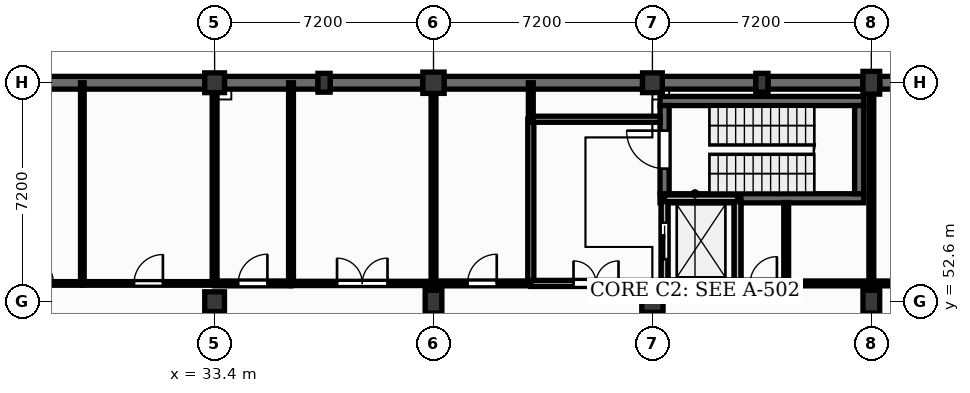
"""IFC4 building model, lengths in metres.
Left out: names, types, materials, properties, quantities, classifications, styles, units other than length and angle.
Written with IfcOpenShell. Run it as: python <this file> out.ifc"""

import sys

from ifc_helpers import new_model, si_unit, direction, frame, frame_2d, origin, origin_2d, place, context, subcontext, project, spatial, rectangle, extrude, element, fill, save


model = new_model("IFC4")
c1 = context("Model", 3, precision=1e-05, world=origin(), true_north=direction((0.0, 1.0)))
c2 = subcontext(c1, "Body", "Model", "MODEL_VIEW")
j1 = project(units=[si_unit("LENGTHUNIT", "METRE"), si_unit("PLANEANGLEUNIT", "RADIAN")], contexts=[c1])
p1 = place(None, origin())
s1 = spatial("IfcSite", under=j1, at=p1, CompositionType="ELEMENT")
p2 = place(p1, origin())
s2 = spatial("IfcBuilding", under=s1, at=p2, CompositionType="ELEMENT")
p3 = place(p2, frame((0.0, 0.0, -4.5)))
s3 = spatial("IfcBuildingStorey", under=s2, at=p3, CompositionType="ELEMENT", Elevation=-4.5)
for number, where, z_axis, x_axis in (
    (1, (33.4, 52.6, 0.0), (0.0, 0.0, 1.0), (1.0, 0.0, 0.0)),
    (2, (33.4, 59.8, 0.0), (0.0, 0.0, 1.0), (1.0, 0.0, 0.0)),
):
    element("IfcColumn", number, at=place(p3, frame(where, z_axis=z_axis, x_axis=x_axis)), inside=s3, PredefinedType="COLUMN", context=c2, shape_type="SweptSolid", body=[
        extrude(rectangle(XDim=0.65, YDim=0.65, at=origin_2d()), origin(), (0.0, 0.0, 1.0), 4.2),
    ])
p4 = place(p3, frame((40.6, 52.6, 0.0), z_axis=(0.0, 0.0, 1.0), x_axis=(1.0, 0.0, 0.0)))
e3 = element("IfcColumn", 3, at=p4, inside=s3, PredefinedType="COLUMN", context=c2, shape_type="SweptSolid", body=[
    extrude(rectangle(XDim=0.55, YDim=0.75, at=origin_2d()), origin(), (0.0, 0.0, 1.0), 4.2),
])
for number, where, z_axis, x_axis in (
    (4, (40.6, 59.8, 0.0), (0.0, 0.0, 1.0), (1.0, 0.0, 0.0)),
    (5, (47.8, 52.6, 0.0), (0.0, 0.0, 1.0), (1.0, 0.0, 0.0)),
):
    element("IfcColumn", number, at=place(p3, frame(where, z_axis=z_axis, x_axis=x_axis)), inside=s3, PredefinedType="COLUMN", context=c2, shape_type="SweptSolid", body=[
        extrude(rectangle(XDim=0.7, YDim=0.7, at=origin_2d()), origin(), (0.0, 0.0, 1.0), 4.2),
    ])
p5 = place(p3, frame((47.8, 59.8, 0.0), z_axis=(0.0, 0.0, 1.0), x_axis=(1.0, 0.0, 0.0)))
e6 = element("IfcColumn", 6, at=p5, inside=s3, PredefinedType="COLUMN", context=c2, shape_type="SweptSolid", body=[
    extrude(rectangle(XDim=0.65, YDim=0.65, at=origin_2d()), origin(), (0.0, 0.0, 1.0), 4.2),
])
for number, where, z_axis, x_axis in (
    (7, (55.0, 52.6, 0.0), (0.0, 0.0, 1.0), (1.0, 0.0, 0.0)),
    (8, (55.0, 59.8, 0.0), (0.0, 0.0, 1.0), (1.0, 0.0, 0.0)),
):
    element("IfcColumn", number, at=place(p3, frame(where, z_axis=z_axis, x_axis=x_axis)), inside=s3, PredefinedType="COLUMN", context=c2, shape_type="SweptSolid", body=[
        extrude(rectangle(XDim=0.55, YDim=0.75, at=origin_2d()), origin(), (0.0, 0.0, 1.0), 4.2),
    ])
for number, where, z_axis, x_axis in (
    (9, (37.0, 59.8, 0.0), (0.0, 0.0, 1.0), (1.0, 0.0, 0.0)),
    (10, (51.4, 59.8, 0.0), (0.0, 0.0, 1.0), (1.0, 0.0, 0.0)),
):
    element("IfcColumn", number, at=place(p3, frame(where, z_axis=z_axis, x_axis=x_axis)), inside=s3, PredefinedType="PILASTER", context=c2, shape_type="SweptSolid", body=[
        extrude(rectangle(XDim=0.4, YDim=0.62, at=origin_2d()), origin(), (0.0, 0.0, 1.0), 4.2),
    ])
p6 = place(p3, frame((26.475, 59.8, 0.0), z_axis=(0.0, 0.0, 1.0), x_axis=(1.0, 0.0, 0.0)))
e11 = element("IfcWall", 11, at=p6, inside=s3, PredefinedType="USERDEFINED", context=c2, shape_type="SweptSolid", body=[
    extrude(rectangle(XDim=6.6, YDim=0.42, at=frame_2d((3.3, 0.0))), origin(), (0.0, 0.0, 1.0), 4.2),
])
p7 = place(p3, frame((33.725, 59.8, 0.0), z_axis=(0.0, 0.0, 1.0), x_axis=(1.0, 0.0, 0.0)))
e12 = element("IfcWall", 12, at=p7, inside=s3, PredefinedType="USERDEFINED", context=c2, shape_type="SweptSolid", body=[
    extrude(rectangle(XDim=3.075, YDim=0.42, at=frame_2d((1.538, 0.0))), origin(), (0.0, 0.0, 1.0), 4.2),
])
p8 = place(p3, frame((37.2, 59.8, 0.0), z_axis=(0.0, 0.0, 1.0), x_axis=(1.0, 0.0, 0.0)))
e13 = element("IfcWall", 13, at=p8, inside=s3, PredefinedType="USERDEFINED", context=c2, shape_type="SweptSolid", body=[
    extrude(rectangle(XDim=3.05, YDim=0.42, at=frame_2d((1.525, 0.0))), origin(), (0.0, 0.0, 1.0), 4.2),
])
p9 = place(p3, frame((40.95, 59.8, 0.0), z_axis=(0.0, 0.0, 1.0), x_axis=(1.0, 0.0, 0.0)))
e14 = element("IfcWall", 14, at=p9, inside=s3, PredefinedType="USERDEFINED", context=c2, shape_type="SweptSolid", body=[
    extrude(rectangle(XDim=6.525, YDim=0.42, at=frame_2d((3.263, 0.0))), origin(), (0.0, 0.0, 1.0), 4.2),
])
p10 = place(p3, frame((48.125, 59.8, 0.0), z_axis=(0.0, 0.0, 1.0), x_axis=(1.0, 0.0, 0.0)))
e15 = element("IfcWall", 15, at=p10, inside=s3, PredefinedType="USERDEFINED", context=c2, shape_type="SweptSolid", body=[
    extrude(rectangle(XDim=3.075, YDim=0.42, at=frame_2d((1.538, 0.0))), origin(), (0.0, 0.0, 1.0), 4.2),
])
p11 = place(p3, frame((51.6, 59.8, 0.0), z_axis=(0.0, 0.0, 1.0), x_axis=(1.0, 0.0, 0.0)))
e16 = element("IfcWall", 16, at=p11, inside=s3, PredefinedType="USERDEFINED", context=c2, shape_type="SweptSolid", body=[
    extrude(rectangle(XDim=3.125, YDim=0.42, at=frame_2d((1.562, 0.0))), origin(), (0.0, 0.0, 1.0), 4.2),
])
p12 = place(p3, frame((55.275, 59.8, 0.0), z_axis=(0.0, 0.0, 1.0), x_axis=(1.0, 0.0, 0.0)))
e17 = element("IfcWall", 17, at=p12, inside=s3, PredefinedType="USERDEFINED", context=c2, shape_type="SweptSolid", body=[
    extrude(rectangle(XDim=3.15, YDim=0.42, at=frame_2d((1.575, 0.0))), origin(), (0.0, 0.0, 1.0), 4.2),
])
for number, where, z_axis, x_axis in (
    (18, (48.05, 56.0, 0.0), (0.0, 0.0, 1.0), (1.0, 0.0, 0.0)),
    (19, (48.05, 59.2, 0.0), (0.0, 0.0, 1.0), (1.0, 0.0, 0.0)),
):
    element("IfcWall", number, at=place(p3, frame(where, z_axis=z_axis, x_axis=x_axis)), inside=s3, PredefinedType="SHEAR", context=c2, shape_type="SweptSolid", body=[
        extrude(rectangle(XDim=6.7, YDim=0.3, at=frame_2d((3.35, 0.0))), origin(), (0.0, 0.0, 1.0), 4.25),
    ])
p13 = place(p3, frame((48.2, 56.15, 0.0), z_axis=(0.0, 0.0, 1.0), x_axis=(0.0, 1.0, 0.0)))
e20 = element("IfcWall", 20, at=p13, inside=s3, PredefinedType="SHEAR", context=c2, shape_type="SweptSolid", body=[
    extrude(rectangle(XDim=2.9, YDim=0.3, at=frame_2d((1.45, 0.0))), origin(), (0.0, 0.0, 1.0), 4.25),
])
p14 = place(p13, frame((0.825, 0.0, 0.0)))
e21 = element("IfcOpeningElement", 21, at=p14, cuts=e20, PredefinedType="OPENING", context=c2, shape_type="SweptSolid", body=[
    extrude(rectangle(XDim=1.25, YDim=2.15, at=frame_2d((0.625, 1.075))), frame((0.0, 0.16, 0.0), z_axis=(0.0, -1.0, 0.0), x_axis=(1.0, 0.0, 0.0)), (0.0, 0.0, 1.0), 0.32),
])
p15 = place(p3, frame((54.6, 56.15, 0.0), z_axis=(0.0, 0.0, 1.0), x_axis=(0.0, 1.0, 0.0)))
e22 = element("IfcWall", 22, at=p15, inside=s3, PredefinedType="SHEAR", context=c2, shape_type="SweptSolid", body=[
    extrude(rectangle(XDim=2.9, YDim=0.3, at=frame_2d((1.45, 0.0))), origin(), (0.0, 0.0, 1.0), 4.25),
])
p16 = place(p3, frame((48.2, 53.2, 0.0), z_axis=(0.0, 0.0, 1.0), x_axis=(1.0, 0.0, 0.0)))
e23 = element("IfcWall", 23, at=p16, inside=s3, PredefinedType="SOLIDWALL", context=c2, shape_type="SweptSolid", body=[
    extrude(rectangle(XDim=2.4, YDim=0.22, at=frame_2d((1.2, 0.0))), origin(), (0.0, 0.0, 1.0), 4.25),
])
p17 = place(p3, frame((48.2, 53.31, 0.0), z_axis=(0.0, 0.0, 1.0), x_axis=(0.0, 1.0, 0.0)))
e24 = element("IfcWall", 24, at=p17, inside=s3, PredefinedType="SOLIDWALL", context=c2, shape_type="SweptSolid", body=[
    extrude(rectangle(XDim=2.58, YDim=0.22, at=frame_2d((1.29, 0.0))), origin(), (0.0, 0.0, 1.0), 4.25),
])
p18 = place(p17, frame((0.69, 0.0, 0.0)))
e25 = element("IfcOpeningElement", 25, at=p18, cuts=e24, PredefinedType="OPENING", context=c2, shape_type="SweptSolid", body=[
    extrude(rectangle(XDim=1.2, YDim=2.15, at=frame_2d((0.6, 1.075))), frame((0.0, 0.12, 0.0), z_axis=(0.0, -1.0, 0.0), x_axis=(1.0, 0.0, 0.0)), (0.0, 0.0, 1.0), 0.24),
])
p19 = place(p3, frame((50.6, 53.31, 0.0), z_axis=(0.0, 0.0, 1.0), x_axis=(0.0, 1.0, 0.0)))
e26 = element("IfcWall", 26, at=p19, inside=s3, PredefinedType="SOLIDWALL", context=c2, shape_type="SweptSolid", body=[
    extrude(rectangle(XDim=2.58, YDim=0.22, at=frame_2d((1.29, 0.0))), origin(), (0.0, 0.0, 1.0), 4.25),
])
for number, where, z_axis, x_axis in (
    (27, (48.2, 53.2, -0.9), (0.0, 0.0, 1.0), (0.0, 1.0, 0.0)),
    (28, (50.6, 53.2, -0.9), (0.0, 0.0, 1.0), (0.0, 1.0, 0.0)),
):
    element("IfcWall", number, at=place(p3, frame(where, z_axis=z_axis, x_axis=x_axis)), inside=s3, PredefinedType="SOLIDWALL", context=c2, shape_type="SweptSolid", body=[
        extrude(rectangle(XDim=2.8, YDim=0.22, at=frame_2d((1.4, 0.0))), origin(), (0.0, 0.0, 1.0), 0.9),
    ])
for number, where, z_axis, x_axis in (
    (29, (48.2, 53.2, -0.9), (0.0, 0.0, 1.0), (1.0, 0.0, 0.0)),
    (30, (48.2, 56.0, -0.9), (0.0, 0.0, 1.0), (1.0, 0.0, 0.0)),
):
    element("IfcWall", number, at=place(p3, frame(where, z_axis=z_axis, x_axis=x_axis)), inside=s3, PredefinedType="SOLIDWALL", context=c2, shape_type="SweptSolid", body=[
        extrude(rectangle(XDim=2.4, YDim=0.22, at=frame_2d((1.2, 0.0))), origin(), (0.0, 0.0, 1.0), 0.9),
    ])
p20 = place(p3, frame((26.2, 53.2, 0.0), z_axis=(0.0, 0.0, 1.0), x_axis=(1.0, 0.0, 0.0)))
e31 = element("IfcWall", 31, at=p20, inside=s3, PredefinedType="PLUMBINGWALL", context=c2, shape_type="SweptSolid", body=[
    extrude(rectangle(XDim=2.85, YDim=0.12, at=frame_2d((1.425, 0.0))), origin(), (0.0, 0.0, 1.0), 4.08),
])
p21 = place(p20, frame((0.95, 0.0, 0.0)))
e32 = element("IfcOpeningElement", 32, at=p21, cuts=e31, PredefinedType="OPENING", context=c2, shape_type="SweptSolid", body=[
    extrude(rectangle(XDim=0.95, YDim=2.1, at=frame_2d((0.475, 1.05))), frame((0.0, 0.07, 0.0), z_axis=(0.0, -1.0, 0.0), x_axis=(1.0, 0.0, 0.0)), (0.0, 0.0, 1.0), 0.14),
])
p22 = place(p3, frame((29.05, 53.27, 0.0), z_axis=(0.0, 0.0, 1.0), x_axis=(0.0, 1.0, 0.0)))
e33 = element("IfcWall", 33, at=p22, inside=s3, PredefinedType="PLUMBINGWALL", context=c2, shape_type="SweptSolid", body=[
    extrude(rectangle(XDim=6.53, YDim=0.12, at=frame_2d((3.265, 0.0))), origin(), (0.0, 0.0, 1.0), 4.08),
])
p23 = place(p3, frame((29.05, 53.2, 0.0), z_axis=(0.0, 0.0, 1.0), x_axis=(1.0, 0.0, 0.0)))
e34 = element("IfcWall", 34, at=p23, inside=s3, PredefinedType="PLUMBINGWALL", context=c2, shape_type="SweptSolid", body=[
    extrude(rectangle(XDim=4.35, YDim=0.12, at=frame_2d((2.175, 0.0))), origin(), (0.0, 0.0, 1.0), 4.08),
])
p24 = place(p23, frame((1.7, 0.0, 0.0)))
e35 = element("IfcOpeningElement", 35, at=p24, cuts=e34, PredefinedType="OPENING", context=c2, shape_type="SweptSolid", body=[
    extrude(rectangle(XDim=0.95, YDim=2.1, at=frame_2d((0.475, 1.05))), frame((0.0, 0.07, 0.0), z_axis=(0.0, -1.0, 0.0), x_axis=(1.0, 0.0, 0.0)), (0.0, 0.0, 1.0), 0.14),
])
p25 = place(p3, frame((33.4, 53.27, 0.0), z_axis=(0.0, 0.0, 1.0), x_axis=(0.0, 1.0, 0.0)))
e36 = element("IfcWall", 36, at=p25, inside=s3, PredefinedType="PARTITIONING", context=c2, shape_type="SweptSolid", body=[
    extrude(rectangle(XDim=6.205, YDim=0.16, at=frame_2d((3.103, 0.0))), origin(), (0.0, 0.0, 1.0), 3.5),
])
p26 = place(p3, frame((33.4, 53.2, 0.0), z_axis=(0.0, 0.0, 1.0), x_axis=(1.0, 0.0, 0.0)))
e37 = element("IfcWall", 37, at=p26, inside=s3, PredefinedType="PARTITIONING", context=c2, shape_type="SweptSolid", body=[
    extrude(rectangle(XDim=2.513, YDim=0.16, at=frame_2d((1.257, 0.0))), origin(), (0.0, 0.0, 1.0), 4.08),
])
p27 = place(p26, frame((0.777, 0.0, 0.0)))
e38 = element("IfcOpeningElement", 38, at=p27, cuts=e37, PredefinedType="OPENING", context=c2, shape_type="SweptSolid", body=[
    extrude(rectangle(XDim=0.96, YDim=2.1, at=frame_2d((0.48, 1.05))), frame((0.0, 0.09, 0.0), z_axis=(0.0, -1.0, 0.0), x_axis=(1.0, 0.0, 0.0)), (0.0, 0.0, 1.0), 0.18),
])
p28 = place(p3, frame((35.913, 53.27, 0.0), z_axis=(0.0, 0.0, 1.0), x_axis=(0.0, 1.0, 0.0)))
e39 = element("IfcWall", 39, at=p28, inside=s3, PredefinedType="PARTITIONING", context=c2, shape_type="SweptSolid", body=[
    extrude(rectangle(XDim=6.53, YDim=0.16, at=frame_2d((3.265, 0.0))), origin(), (0.0, 0.0, 1.0), 4.08),
])
p29 = place(p3, frame((35.913, 53.2, 0.0), z_axis=(0.0, 0.0, 1.0), x_axis=(1.0, 0.0, 0.0)))
e40 = element("IfcWall", 40, at=p29, inside=s3, PredefinedType="PARTITIONING", context=c2, shape_type="SweptSolid", body=[
    extrude(rectangle(XDim=4.687, YDim=0.14, at=frame_2d((2.344, 0.0))), origin(), (0.0, 0.0, 1.0), 4.08),
])
p30 = place(p29, frame((1.513, 0.0, 0.0)))
e41 = element("IfcOpeningElement", 41, at=p30, cuts=e40, PredefinedType="OPENING", context=c2, shape_type="SweptSolid", body=[
    extrude(rectangle(XDim=1.66, YDim=2.3, at=frame_2d((0.83, 1.15))), frame((0.0, 0.08, 0.0), z_axis=(0.0, -1.0, 0.0), x_axis=(1.0, 0.0, 0.0)), (0.0, 0.0, 1.0), 0.16),
])
p31 = place(p3, frame((40.6, 53.27, 0.0), z_axis=(0.0, 0.0, 1.0), x_axis=(0.0, 1.0, 0.0)))
e42 = element("IfcWall", 42, at=p31, inside=s3, PredefinedType="PARTITIONING", context=c2, shape_type="SweptSolid", body=[
    extrude(rectangle(XDim=6.18, YDim=0.16, at=frame_2d((3.09, 0.0))), origin(), (0.0, 0.0, 1.0), 3.5),
])
p32 = place(p3, frame((40.6, 53.2, 0.0), z_axis=(0.0, 0.0, 1.0), x_axis=(1.0, 0.0, 0.0)))
e43 = element("IfcWall", 43, at=p32, inside=s3, PredefinedType="PARTITIONING", context=c2, shape_type="SweptSolid", body=[
    extrude(rectangle(XDim=3.2, YDim=0.16, at=frame_2d((1.6, 0.0))), origin(), (0.0, 0.0, 1.0), 4.08),
])
p33 = place(p32, frame((1.12, 0.0, 0.0)))
e44 = element("IfcOpeningElement", 44, at=p33, cuts=e43, PredefinedType="OPENING", context=c2, shape_type="SweptSolid", body=[
    extrude(rectangle(XDim=0.96, YDim=2.1, at=frame_2d((0.48, 1.05))), frame((0.0, 0.09, 0.0), z_axis=(0.0, -1.0, 0.0), x_axis=(1.0, 0.0, 0.0)), (0.0, 0.0, 1.0), 0.18),
])
p34 = place(p3, frame((43.8, 53.27, 0.0), z_axis=(0.0, 0.0, 1.0), x_axis=(0.0, 1.0, 0.0)))
e45 = element("IfcWall", 45, at=p34, inside=s3, PredefinedType="PARTITIONING", context=c2, shape_type="SweptSolid", body=[
    extrude(rectangle(XDim=5.33, YDim=0.2, at=frame_2d((2.665, 0.0))), origin(), (0.0, 0.0, 1.0), 4.08),
])
p35 = place(p3, frame((43.8, 53.2, 0.0), z_axis=(0.0, 0.0, 1.0), x_axis=(1.0, 0.0, 0.0)))
e46 = element("IfcWall", 46, at=p35, inside=s3, PredefinedType="PARTITIONING", context=c2, shape_type="SweptSolid", body=[
    extrude(rectangle(XDim=4.29, YDim=0.2, at=frame_2d((2.145, 0.0))), origin(), (0.0, 0.0, 1.0), 4.08),
])
p36 = place(p35, frame((1.405, 0.0, 0.0)))
e47 = element("IfcOpeningElement", 47, at=p36, cuts=e46, PredefinedType="OPENING", context=c2, shape_type="SweptSolid", body=[
    extrude(rectangle(XDim=1.48, YDim=2.25, at=frame_2d((0.74, 1.125))), frame((0.0, 0.11, 0.0), z_axis=(0.0, -1.0, 0.0), x_axis=(1.0, 0.0, 0.0)), (0.0, 0.0, 1.0), 0.22),
])
p37 = place(p3, frame((50.71, 53.2, 0.0), z_axis=(0.0, 0.0, 1.0), x_axis=(1.0, 0.0, 0.0)))
e48 = element("IfcWall", 48, at=p37, inside=s3, PredefinedType="SOLIDWALL", context=c2, shape_type="SweptSolid", body=[
    extrude(rectangle(XDim=1.49, YDim=0.22, at=frame_2d((0.745, 0.0))), origin(), (0.0, 0.0, 1.0), 4.08),
])
p38 = place(p37, frame((0.305, 0.0, 0.0)))
e49 = element("IfcOpeningElement", 49, at=p38, cuts=e48, PredefinedType="OPENING", context=c2, shape_type="SweptSolid", body=[
    extrude(rectangle(XDim=0.88, YDim=2.05, at=frame_2d((0.44, 1.025))), frame((0.0, 0.12, 0.0), z_axis=(0.0, -1.0, 0.0), x_axis=(1.0, 0.0, 0.0)), (0.0, 0.0, 1.0), 0.24),
])
p39 = place(p3, frame((55.0, 53.2, 0.0), z_axis=(0.0, 0.0, 1.0), x_axis=(1.0, 0.0, 0.0)))
e50 = element("IfcWall", 50, at=p39, inside=s3, PredefinedType="PARTITIONING", context=c2, shape_type="SweptSolid", body=[
    extrude(rectangle(XDim=7.2, YDim=0.16, at=frame_2d((3.6, 0.0))), origin(), (0.0, 0.0, 1.0), 4.08),
])
p40 = place(p39, frame((3.12, 0.0, 0.0)))
e51 = element("IfcOpeningElement", 51, at=p40, cuts=e50, PredefinedType="OPENING", context=c2, shape_type="SweptSolid", body=[
    extrude(rectangle(XDim=0.96, YDim=2.1, at=frame_2d((0.48, 1.05))), frame((0.0, 0.09, 0.0), z_axis=(0.0, -1.0, 0.0), x_axis=(1.0, 0.0, 0.0)), (0.0, 0.0, 1.0), 0.18),
])
p41 = place(p3, frame((52.2, 53.27, 0.0), z_axis=(0.0, 0.0, 1.0), x_axis=(0.0, 1.0, 0.0)))
e52 = element("IfcWall", 52, at=p41, inside=s3, PredefinedType="PARTITIONING", context=c2, shape_type="SweptSolid", body=[
    extrude(rectangle(XDim=2.59, YDim=0.16, at=frame_2d((1.295, 0.0))), origin(), (0.0, 0.0, 1.0), 4.08),
])
p42 = place(p3, frame((48.06, 58.6, 0.0), z_axis=(0.0, 0.0, 1.0), x_axis=(-1.0, 0.0, 0.0)))
e53 = element("IfcWall", 53, at=p42, inside=s3, PredefinedType="PARTITIONING", context=c2, shape_type="SweptSolid", body=[
    extrude(rectangle(XDim=4.26, YDim=0.2, at=frame_2d((2.13, 0.0))), origin(), (0.0, 0.0, 1.0), 4.08),
])
p43 = place(p3, frame((55.0, 53.2, 0.0), z_axis=(0.0, 0.0, 1.0), x_axis=(-1.0, 0.0, 0.0)))
e54 = element("IfcWall", 54, at=p43, inside=s3, PredefinedType="PARTITIONING", context=c2, shape_type="SweptSolid", body=[
    extrude(rectangle(XDim=2.8, YDim=0.16, at=frame_2d((1.4, 0.0))), origin(), (0.0, 0.0, 1.0), 4.08),
])
p44 = place(p3, frame((43.8, 58.6, 0.0), z_axis=(0.0, 0.0, 1.0), x_axis=(0.0, 1.0, 0.0)))
e55 = element("IfcWall", 55, at=p44, inside=s3, PredefinedType="PARTITIONING", context=c2, shape_type="SweptSolid", body=[
    extrude(rectangle(XDim=1.2, YDim=0.16, at=frame_2d((0.6, 0.0))), origin(), (0.0, 0.0, 1.0), 4.08),
])
p45 = place(p3, frame((55.0, 53.27, 0.0), z_axis=(0.0, 0.0, 1.0), x_axis=(0.0, 1.0, 0.0)))
e56 = element("IfcWall", 56, at=p45, inside=s3, PredefinedType="PARTITIONING", context=c2, shape_type="SweptSolid", body=[
    extrude(rectangle(XDim=6.155, YDim=0.16, at=frame_2d((3.078, 0.0))), origin(), (0.0, 0.0, 1.0), 3.5),
])
p46 = place(p18, origin())
e57 = element("IfcDoor", 57, at=p46, inside=s3, OperationType="SLIDING_TO_LEFT", PredefinedType="DOOR", context=c2, shape_type="SweptSolid", body=[
    extrude(rectangle(XDim=1.2, YDim=2.15, at=frame_2d((0.6, 1.075))), frame((0.0, 0.025, 0.0), z_axis=(0.0, -1.0, 0.0), x_axis=(1.0, 0.0, 0.0)), (0.0, 0.0, 1.0), 0.05),
])
fill(e25, e57)
p47 = place(p14, origin())
e58 = element("IfcDoor", 58, at=p47, inside=s3, OperationType="SINGLE_SWING_RIGHT", PredefinedType="DOOR", context=c2, shape_type="SweptSolid", body=[
    extrude(rectangle(XDim=1.25, YDim=2.15, at=frame_2d((0.625, 1.075))), frame((0.0, 0.025, 0.0), z_axis=(0.0, -1.0, 0.0), x_axis=(1.0, 0.0, 0.0)), (0.0, 0.0, 1.0), 0.05),
])
fill(e21, e58)
p48 = place(p36, origin())
e59 = element("IfcDoor", 59, at=p48, inside=s3, OperationType="DOUBLE_DOOR_SINGLE_SWING", PredefinedType="DOOR", context=c2, shape_type="SweptSolid", body=[
    extrude(rectangle(XDim=1.48, YDim=2.25, at=frame_2d((0.74, 1.125))), frame((0.0, 0.025, 0.0), z_axis=(0.0, -1.0, 0.0), x_axis=(1.0, 0.0, 0.0)), (0.0, 0.0, 1.0), 0.05),
])
fill(e47, e59)
p49 = place(p38, origin())
e60 = element("IfcDoor", 60, at=p49, inside=s3, OperationType="SINGLE_SWING_RIGHT", PredefinedType="DOOR", context=c2, shape_type="SweptSolid", body=[
    extrude(rectangle(XDim=0.88, YDim=2.05, at=frame_2d((0.44, 1.025))), frame((0.0, 0.025, 0.0), z_axis=(0.0, -1.0, 0.0), x_axis=(1.0, 0.0, 0.0)), (0.0, 0.0, 1.0), 0.05),
])
fill(e49, e60)
p50 = place(p21, origin())
e61 = element("IfcDoor", 61, at=p50, inside=s3, OperationType="SINGLE_SWING_LEFT", PredefinedType="DOOR", context=c2, shape_type="SweptSolid", body=[
    extrude(rectangle(XDim=0.95, YDim=2.1, at=frame_2d((0.475, 1.05))), frame((0.0, 0.025, 0.0), z_axis=(0.0, -1.0, 0.0), x_axis=(1.0, 0.0, 0.0)), (0.0, 0.0, 1.0), 0.05),
])
fill(e32, e61)
p51 = place(p24, origin())
e62 = element("IfcDoor", 62, at=p51, inside=s3, OperationType="SINGLE_SWING_RIGHT", PredefinedType="DOOR", context=c2, shape_type="SweptSolid", body=[
    extrude(rectangle(XDim=0.95, YDim=2.1, at=frame_2d((0.475, 1.05))), frame((0.0, 0.025, 0.0), z_axis=(0.0, -1.0, 0.0), x_axis=(1.0, 0.0, 0.0)), (0.0, 0.0, 1.0), 0.05),
])
fill(e35, e62)
p52 = place(p27, origin())
e63 = element("IfcDoor", 63, at=p52, inside=s3, OperationType="SINGLE_SWING_RIGHT", PredefinedType="DOOR", context=c2, shape_type="SweptSolid", body=[
    extrude(rectangle(XDim=0.96, YDim=2.1, at=frame_2d((0.48, 1.05))), frame((0.0, 0.025, 0.0), z_axis=(0.0, -1.0, 0.0), x_axis=(1.0, 0.0, 0.0)), (0.0, 0.0, 1.0), 0.05),
])
fill(e38, e63)
p53 = place(p30, origin())
e64 = element("IfcDoor", 64, at=p53, inside=s3, OperationType="DOUBLE_DOOR_SINGLE_SWING", PredefinedType="DOOR", context=c2, shape_type="SweptSolid", body=[
    extrude(rectangle(XDim=1.66, YDim=2.3, at=frame_2d((0.83, 1.15))), frame((0.0, 0.025, 0.0), z_axis=(0.0, -1.0, 0.0), x_axis=(1.0, 0.0, 0.0)), (0.0, 0.0, 1.0), 0.05),
])
fill(e41, e64)
p54 = place(p33, origin())
e65 = element("IfcDoor", 65, at=p54, inside=s3, OperationType="SINGLE_SWING_RIGHT", PredefinedType="DOOR", context=c2, shape_type="SweptSolid", body=[
    extrude(rectangle(XDim=0.96, YDim=2.1, at=frame_2d((0.48, 1.05))), frame((0.0, 0.025, 0.0), z_axis=(0.0, -1.0, 0.0), x_axis=(1.0, 0.0, 0.0)), (0.0, 0.0, 1.0), 0.05),
])
fill(e44, e65)
save(model, sys.argv[1])
